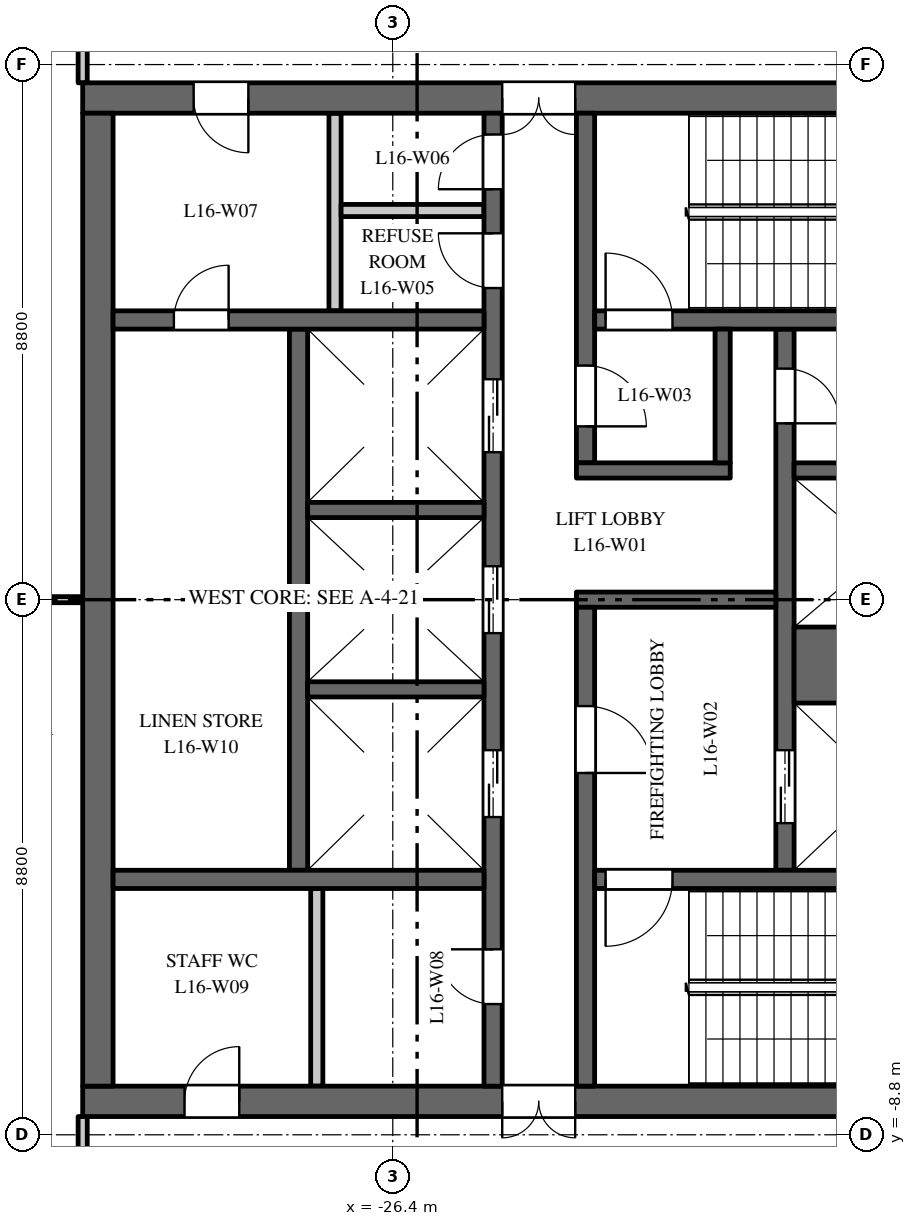
"""IFC4 building model, lengths in metres.
Left out: names, types, materials, properties, quantities, classifications, styles, units other than length and angle.
Written with IfcOpenShell. Run it as: python <this file> out.ifc"""

import sys

from ifc_helpers import new_model, si_unit, direction, frame, frame_2d, origin, place, context, subcontext, project, spatial, rectangle, extrude, element, fill, save


model = new_model("IFC4")
c1 = context("Model", 3, precision=1e-05, world=origin(), true_north=direction((0.0, 1.0)))
c2 = subcontext(c1, "Body", "Model", "MODEL_VIEW")
j1 = project(units=[si_unit("LENGTHUNIT", "METRE"), si_unit("PLANEANGLEUNIT", "RADIAN")], contexts=[c1])
p1 = place(None, origin())
s1 = spatial("IfcSite", under=j1, at=p1, CompositionType="ELEMENT")
p2 = place(p1, origin())
s2 = spatial("IfcBuilding", under=s1, at=p2, CompositionType="ELEMENT")
p3 = place(p2, frame((0.0, 0.0, 74.5)))
s3 = spatial("IfcBuildingStorey", under=s2, at=p3, CompositionType="ELEMENT", Elevation=74.5)
p4 = place(p3, frame((-16.5, 8.25, 0.0), z_axis=(0.0, 0.0, 1.0), x_axis=(-1.0, 0.0, 0.0)))
e1 = element("IfcWall", 1, at=p4, inside=s3, PredefinedType="SHEAR", context=c2, shape_type="SweptSolid", body=[
    extrude(rectangle(XDim=15.0, YDim=0.5, at=frame_2d((7.5, 0.0))), origin(), (0.0, 0.0, 1.0), 3.7),
])
p5 = place(p4, frame((6.9, 0.0, 0.0)))
e2 = element("IfcOpeningElement", 2, at=p5, cuts=e1, PredefinedType="OPENING", context=c2, shape_type="SweptSolid", body=[
    extrude(rectangle(XDim=1.2, YDim=2.1, at=frame_2d((0.6, 1.05))), frame((0.0, 0.26, 0.0), z_axis=(0.0, -1.0, 0.0), x_axis=(1.0, 0.0, 0.0)), (0.0, 0.0, 1.0), 0.52),
])
p6 = place(p4, frame((12.275, 0.0, 0.0)))
e3 = element("IfcOpeningElement", 3, at=p6, cuts=e1, PredefinedType="OPENING", context=c2, shape_type="SweptSolid", body=[
    extrude(rectangle(XDim=0.9, YDim=2.1, at=frame_2d((0.45, 1.05))), frame((0.0, 0.26, 0.0), z_axis=(0.0, -1.0, 0.0), x_axis=(1.0, 0.0, 0.0)), (0.0, 0.0, 1.0), 0.52),
])
p7 = place(p3, frame((-16.5, -8.25, 0.0), z_axis=(0.0, 0.0, 1.0), x_axis=(-1.0, 0.0, 0.0)))
e4 = element("IfcWall", 4, at=p7, inside=s3, PredefinedType="SHEAR", context=c2, shape_type="SweptSolid", body=[
    extrude(rectangle(XDim=15.0, YDim=0.5, at=frame_2d((7.5, 0.0))), origin(), (0.0, 0.0, 1.0), 3.7),
])
p8 = place(p7, frame((6.9, 0.0, 0.0)))
e5 = element("IfcOpeningElement", 5, at=p8, cuts=e4, PredefinedType="OPENING", context=c2, shape_type="SweptSolid", body=[
    extrude(rectangle(XDim=1.2, YDim=2.1, at=frame_2d((0.6, 1.05))), frame((0.0, 0.26, 0.0), z_axis=(0.0, -1.0, 0.0), x_axis=(1.0, 0.0, 0.0)), (0.0, 0.0, 1.0), 0.52),
])
p9 = place(p7, frame((12.425, 0.0, 0.0)))
e6 = element("IfcOpeningElement", 6, at=p9, cuts=e4, PredefinedType="OPENING", context=c2, shape_type="SweptSolid", body=[
    extrude(rectangle(XDim=0.9, YDim=2.1, at=frame_2d((0.45, 1.05))), frame((0.0, 0.26, 0.0), z_axis=(0.0, -1.0, 0.0), x_axis=(1.0, 0.0, 0.0)), (0.0, 0.0, 1.0), 0.52),
])
p10 = place(p3, frame((-27.95, -4.45, 0.0), z_axis=(0.0, 0.0, 1.0), x_axis=(0.0, 1.0, 0.0)))
e7 = element("IfcWall", 7, at=p10, inside=s3, PredefinedType="SHEAR", context=c2, shape_type="SweptSolid", body=[
    extrude(rectangle(XDim=8.9, YDim=0.3, at=frame_2d((4.45, 0.0))), origin(), (0.0, 0.0, 1.0), 3.7),
])
p11 = place(p3, frame((-19.95, -4.45, 0.0), z_axis=(0.0, 0.0, 1.0), x_axis=(0.0, 1.0, 0.0)))
e8 = element("IfcWall", 8, at=p11, inside=s3, PredefinedType="SHEAR", context=c2, shape_type="SweptSolid", body=[
    extrude(rectangle(XDim=8.9, YDim=0.3, at=frame_2d((4.45, 0.0))), origin(), (0.0, 0.0, 1.0), 3.7),
])
p12 = place(p11, frame((0.775, 0.0, 0.0)))
e9 = element("IfcOpeningElement", 9, at=p12, cuts=e8, PredefinedType="OPENING", context=c2, shape_type="SweptSolid", body=[
    extrude(rectangle(XDim=1.2, YDim=2.1, at=frame_2d((0.6, 1.05))), frame((0.0, 0.16, 0.0), z_axis=(0.0, -1.0, 0.0), x_axis=(1.0, 0.0, 0.0)), (0.0, 0.0, 1.0), 0.32),
])
p13 = place(p11, frame((7.35, 0.0, 0.0)))
e10 = element("IfcOpeningElement", 10, at=p13, cuts=e8, PredefinedType="OPENING", context=c2, shape_type="SweptSolid", body=[
    extrude(rectangle(XDim=0.9, YDim=2.1, at=frame_2d((0.45, 1.05))), frame((0.0, 0.16, 0.0), z_axis=(0.0, -1.0, 0.0), x_axis=(1.0, 0.0, 0.0)), (0.0, 0.0, 1.0), 0.32),
])
p14 = place(p3, frame((-24.75, -8.0, 0.0), z_axis=(0.0, 0.0, 1.0), x_axis=(0.0, 1.0, 0.0)))
e11 = element("IfcWall", 11, at=p14, inside=s3, PredefinedType="SHEAR", context=c2, shape_type="SweptSolid", body=[
    extrude(rectangle(XDim=16.0, YDim=0.3, at=frame_2d((8.0, 0.0))), origin(), (0.0, 0.0, 1.0), 3.7),
])
p15 = place(p14, frame((4.425, 0.0, 0.0)))
e12 = element("IfcOpeningElement", 12, at=p15, cuts=e11, PredefinedType="OPENING", context=c2, shape_type="SweptSolid", body=[
    extrude(rectangle(XDim=1.1, YDim=2.1, at=frame_2d((0.55, 1.05))), frame((0.0, 0.16, 0.0), z_axis=(0.0, -1.0, 0.0), x_axis=(1.0, 0.0, 0.0)), (0.0, 0.0, 1.0), 0.32),
])
p16 = place(p14, frame((7.45, 0.0, 0.0)))
e13 = element("IfcOpeningElement", 13, at=p16, cuts=e11, PredefinedType="OPENING", context=c2, shape_type="SweptSolid", body=[
    extrude(rectangle(XDim=1.1, YDim=2.1, at=frame_2d((0.55, 1.05))), frame((0.0, 0.16, 0.0), z_axis=(0.0, -1.0, 0.0), x_axis=(1.0, 0.0, 0.0)), (0.0, 0.0, 1.0), 0.32),
])
p17 = place(p14, frame((10.425, 0.0, 0.0)))
e14 = element("IfcOpeningElement", 14, at=p17, cuts=e11, PredefinedType="OPENING", context=c2, shape_type="SweptSolid", body=[
    extrude(rectangle(XDim=1.2, YDim=2.1, at=frame_2d((0.6, 1.05))), frame((0.0, 0.16, 0.0), z_axis=(0.0, -1.0, 0.0), x_axis=(1.0, 0.0, 0.0)), (0.0, 0.0, 1.0), 0.32),
])
p18 = place(p14, frame((13.125, 0.0, 0.0)))
e15 = element("IfcOpeningElement", 15, at=p18, cuts=e11, PredefinedType="OPENING", context=c2, shape_type="SweptSolid", body=[
    extrude(rectangle(XDim=0.9, YDim=2.1, at=frame_2d((0.45, 1.05))), frame((0.0, 0.16, 0.0), z_axis=(0.0, -1.0, 0.0), x_axis=(1.0, 0.0, 0.0)), (0.0, 0.0, 1.0), 0.32),
])
p19 = place(p14, frame((14.75, 0.0, 0.0)))
e16 = element("IfcOpeningElement", 16, at=p19, cuts=e11, PredefinedType="OPENING", context=c2, shape_type="SweptSolid", body=[
    extrude(rectangle(XDim=0.9, YDim=2.1, at=frame_2d((0.45, 1.05))), frame((0.0, 0.16, 0.0), z_axis=(0.0, -1.0, 0.0), x_axis=(1.0, 0.0, 0.0)), (0.0, 0.0, 1.0), 0.32),
])
p20 = place(p14, frame((1.35, 0.0, 0.0)))
e17 = element("IfcOpeningElement", 17, at=p20, cuts=e11, PredefinedType="OPENING", context=c2, shape_type="SweptSolid", body=[
    extrude(rectangle(XDim=0.9, YDim=2.1, at=frame_2d((0.45, 1.05))), frame((0.0, 0.16, 0.0), z_axis=(0.0, -1.0, 0.0), x_axis=(1.0, 0.0, 0.0)), (0.0, 0.0, 1.0), 0.32),
])
p21 = place(p3, frame((-20.1, 0.0, 0.0), z_axis=(0.0, 0.0, 1.0), x_axis=(-1.0, 0.0, 0.0)))
e18 = element("IfcWall", 18, at=p21, inside=s3, PredefinedType="SHEAR", context=c2, shape_type="SweptSolid", body=[
    extrude(rectangle(XDim=3.28, YDim=0.25, at=frame_2d((1.64, 0.0))), origin(), (0.0, 0.0, 1.0), 3.7),
])
p22 = place(p3, frame((-31.25, -8.0, 0.0), z_axis=(0.0, 0.0, 1.0), x_axis=(0.0, 1.0, 0.0)))
e19 = element("IfcWall", 19, at=p22, inside=s3, PredefinedType="SHEAR", context=c2, shape_type="SweptSolid", body=[
    extrude(rectangle(XDim=16.0, YDim=0.5, at=frame_2d((8.0, 0.0))), origin(), (0.0, 0.0, 1.0), 3.7),
])
p23 = place(p3, frame((-24.9, 4.6, 0.0), z_axis=(0.0, 0.0, 1.0), x_axis=(-1.0, 0.0, 0.0)))
e20 = element("IfcWall", 20, at=p23, inside=s3, PredefinedType="SHEAR", context=c2, shape_type="SweptSolid", body=[
    extrude(rectangle(XDim=6.1, YDim=0.3, at=frame_2d((3.05, 0.0))), origin(), (0.0, 0.0, 1.0), 3.7),
])
p24 = place(p23, frame((4.2, 0.0, 0.0)))
e21 = element("IfcOpeningElement", 21, at=p24, cuts=e20, PredefinedType="OPENING", context=c2, shape_type="SweptSolid", body=[
    extrude(rectangle(XDim=0.9, YDim=2.1, at=frame_2d((0.45, 1.05))), frame((0.0, 0.16, 0.0), z_axis=(0.0, -1.0, 0.0), x_axis=(1.0, 0.0, 0.0)), (0.0, 0.0, 1.0), 0.32),
])
for number, where, z_axis, x_axis in (
    (22, (-27.35, 4.75, 0.0), (0.0, 0.0, 1.0), (0.0, 1.0, 0.0)),
    (23, (-27.65, -8.0, 0.0), (0.0, 0.0, 1.0), (0.0, 1.0, 0.0)),
):
    element("IfcWall", number, at=place(p3, frame(where, z_axis=z_axis, x_axis=x_axis)), inside=s3, PredefinedType="PARTITIONING", context=c2, shape_type="SweptSolid", body=[
        extrude(rectangle(XDim=3.25, YDim=0.2, at=frame_2d((1.625, 0.0))), origin(), (0.0, 0.0, 1.0), 3.7),
    ])
p25 = place(p3, frame((-24.9, 6.4, 0.0), z_axis=(0.0, 0.0, 1.0), x_axis=(-1.0, 0.0, 0.0)))
e24 = element("IfcWall", 24, at=p25, inside=s3, PredefinedType="PARTITIONING", context=c2, shape_type="SweptSolid", body=[
    extrude(rectangle(XDim=2.35, YDim=0.2, at=frame_2d((1.175, 0.0))), origin(), (0.0, 0.0, 1.0), 3.7),
])
p26 = place(p3, frame((-24.9, -4.6, 0.0), z_axis=(0.0, 0.0, 1.0), x_axis=(-1.0, 0.0, 0.0)))
e25 = element("IfcWall", 25, at=p26, inside=s3, PredefinedType="SHEAR", context=c2, shape_type="SweptSolid", body=[
    extrude(rectangle(XDim=6.1, YDim=0.3, at=frame_2d((3.05, 0.0))), origin(), (0.0, 0.0, 1.0), 3.7),
])
p27 = place(p3, frame((-16.9, -1.075, 0.0), z_axis=(0.0, 0.0, 1.0), x_axis=(-1.0, 0.0, 0.0)))
e26 = element("IfcWall", 26, at=p27, inside=s3, PredefinedType="SHEAR", context=c2, shape_type="SweptSolid", body=[
    extrude(rectangle(XDim=2.9, YDim=1.25, at=frame_2d((1.45, 0.0))), origin(), (0.0, 0.0, 1.0), 3.7),
])
for number, where, z_axis, x_axis in (
    (27, (-16.9, 2.125, 0.0), (0.0, 0.0, 1.0), (-1.0, 0.0, 0.0)),
    (28, (-24.9, -1.475, 0.0), (0.0, 0.0, 1.0), (-1.0, 0.0, 0.0)),
    (29, (-24.9, 1.475, 0.0), (0.0, 0.0, 1.0), (-1.0, 0.0, 0.0)),
):
    element("IfcWall", number, at=place(p3, frame(where, z_axis=z_axis, x_axis=x_axis)), inside=s3, PredefinedType="SHEAR", context=c2, shape_type="SweptSolid", body=[
        extrude(rectangle(XDim=2.9, YDim=0.25, at=frame_2d((1.45, 0.0))), origin(), (0.0, 0.0, 1.0), 3.7),
    ])
p28 = place(p3, frame((-23.23, 2.25, 0.0), z_axis=(0.0, 0.0, 1.0), x_axis=(0.0, 1.0, 0.0)))
e30 = element("IfcWall", 30, at=p28, inside=s3, PredefinedType="SHEAR", context=c2, shape_type="SweptSolid", body=[
    extrude(rectangle(XDim=5.75, YDim=0.3, at=frame_2d((2.875, 0.0))), origin(), (0.0, 0.0, 1.0), 3.7),
])
p29 = place(p28, frame((0.6, 0.0, 0.0)))
e31 = element("IfcOpeningElement", 31, at=p29, cuts=e30, PredefinedType="OPENING", context=c2, shape_type="SweptSolid", body=[
    extrude(rectangle(XDim=1.0, YDim=2.1, at=frame_2d((0.5, 1.05))), frame((0.0, 0.16, 0.0), z_axis=(0.0, -1.0, 0.0), x_axis=(1.0, 0.0, 0.0)), (0.0, 0.0, 1.0), 0.32),
])
p30 = place(p3, frame((-23.23, -8.0, 0.0), z_axis=(0.0, 0.0, 1.0), x_axis=(0.0, 1.0, 0.0)))
e32 = element("IfcWall", 32, at=p30, inside=s3, PredefinedType="SHEAR", context=c2, shape_type="SweptSolid", body=[
    extrude(rectangle(XDim=7.875, YDim=0.3, at=frame_2d((3.938, 0.0))), origin(), (0.0, 0.0, 1.0), 3.7),
])
p31 = place(p30, frame((5.15, 0.0, 0.0)))
e33 = element("IfcOpeningElement", 33, at=p31, cuts=e32, PredefinedType="OPENING", context=c2, shape_type="SweptSolid", body=[
    extrude(rectangle(XDim=1.1, YDim=2.1, at=frame_2d((0.55, 1.05))), frame((0.0, 0.16, 0.0), z_axis=(0.0, -1.0, 0.0), x_axis=(1.0, 0.0, 0.0)), (0.0, 0.0, 1.0), 0.32),
])
p32 = place(p3, frame((-16.9, 4.6, 0.0), z_axis=(0.0, 0.0, 1.0), x_axis=(-1.0, 0.0, 0.0)))
e34 = element("IfcWall", 34, at=p32, inside=s3, PredefinedType="SHEAR", context=c2, shape_type="SweptSolid", body=[
    extrude(rectangle(XDim=6.18, YDim=0.3, at=frame_2d((3.09, 0.0))), origin(), (0.0, 0.0, 1.0), 3.7),
])
p33 = place(p32, frame((4.9, 0.0, 0.0)))
e35 = element("IfcOpeningElement", 35, at=p33, cuts=e34, PredefinedType="OPENING", context=c2, shape_type="SweptSolid", body=[
    extrude(rectangle(XDim=1.1, YDim=2.1, at=frame_2d((0.55, 1.05))), frame((0.0, 0.16, 0.0), z_axis=(0.0, -1.0, 0.0), x_axis=(1.0, 0.0, 0.0)), (0.0, 0.0, 1.0), 0.32),
])
p34 = place(p3, frame((-16.9, -4.6, 0.0), z_axis=(0.0, 0.0, 1.0), x_axis=(-1.0, 0.0, 0.0)))
e36 = element("IfcWall", 36, at=p34, inside=s3, PredefinedType="SHEAR", context=c2, shape_type="SweptSolid", body=[
    extrude(rectangle(XDim=6.18, YDim=0.3, at=frame_2d((3.09, 0.0))), origin(), (0.0, 0.0, 1.0), 3.7),
])
p35 = place(p34, frame((4.9, 0.0, 0.0)))
e37 = element("IfcOpeningElement", 37, at=p35, cuts=e36, PredefinedType="OPENING", context=c2, shape_type="SweptSolid", body=[
    extrude(rectangle(XDim=1.1, YDim=2.1, at=frame_2d((0.55, 1.05))), frame((0.0, 0.16, 0.0), z_axis=(0.0, -1.0, 0.0), x_axis=(1.0, 0.0, 0.0)), (0.0, 0.0, 1.0), 0.32),
])
p36 = place(p3, frame((-20.85, 2.125, 0.0), z_axis=(0.0, 0.0, 1.0), x_axis=(-1.0, 0.0, 0.0)))
e38 = element("IfcWall", 38, at=p36, inside=s3, PredefinedType="SHEAR", context=c2, shape_type="SweptSolid", body=[
    extrude(rectangle(XDim=2.53, YDim=0.25, at=frame_2d((1.265, 0.0))), origin(), (0.0, 0.0, 1.0), 3.7),
])
p37 = place(p3, frame((-20.975, 2.25, 0.0), z_axis=(0.0, 0.0, 1.0), x_axis=(0.0, 1.0, 0.0)))
e39 = element("IfcWall", 39, at=p37, inside=s3, PredefinedType="SHEAR", context=c2, shape_type="SweptSolid", body=[
    extrude(rectangle(XDim=2.2, YDim=0.25, at=frame_2d((1.1, 0.0))), origin(), (0.0, 0.0, 1.0), 3.7),
])
p38 = place(p3, frame((-35.949, 0.0, 0.0), z_axis=(0.0, 0.0, 1.0), x_axis=(1.0, 0.0, 0.0)))
e40 = element("IfcWall", 40, at=p38, inside=s3, PredefinedType="PARTITIONING", context=c2, shape_type="SweptSolid", body=[
    extrude(rectangle(XDim=4.449, YDim=0.1, at=frame_2d((2.225, 0.0))), origin(), (0.0, 0.0, 1.0), 2.85),
])
for number, where, z_axis, x_axis in (
    (41, (-31.5, -10.7, 0.0), (0.0, 0.0, 1.0), (0.0, 1.0, 0.0)),
    (42, (-31.5, 8.5, 0.0), (0.0, 0.0, 1.0), (0.0, 1.0, 0.0)),
):
    element("IfcWall", number, at=place(p3, frame(where, z_axis=z_axis, x_axis=x_axis)), inside=s3, PredefinedType="PARTITIONING", context=c2, shape_type="SweptSolid", body=[
        extrude(rectangle(XDim=2.2, YDim=0.15, at=frame_2d((1.1, 0.0))), origin(), (0.0, 0.0, 1.0), 3.7),
    ])
p39 = place(p12, origin())
e43 = element("IfcDoor", 43, at=p39, inside=s3, OperationType="DOUBLE_DOOR_SLIDING", PredefinedType="DOOR", context=c2, shape_type="SweptSolid", body=[
    extrude(rectangle(XDim=1.2, YDim=2.1, at=frame_2d((0.6, 1.05))), frame((0.0, 0.025, 0.0), z_axis=(0.0, -1.0, 0.0), x_axis=(1.0, 0.0, 0.0)), (0.0, 0.0, 1.0), 0.05),
])
fill(e9, e43)
p40 = place(p15, origin())
e44 = element("IfcDoor", 44, at=p40, inside=s3, OperationType="DOUBLE_DOOR_SLIDING", PredefinedType="DOOR", context=c2, shape_type="SweptSolid", body=[
    extrude(rectangle(XDim=1.1, YDim=2.1, at=frame_2d((0.55, 1.05))), frame((0.0, 0.025, 0.0), z_axis=(0.0, -1.0, 0.0), x_axis=(1.0, 0.0, 0.0)), (0.0, 0.0, 1.0), 0.05),
])
fill(e12, e44)
p41 = place(p16, origin())
e45 = element("IfcDoor", 45, at=p41, inside=s3, OperationType="DOUBLE_DOOR_SLIDING", PredefinedType="DOOR", context=c2, shape_type="SweptSolid", body=[
    extrude(rectangle(XDim=1.1, YDim=2.1, at=frame_2d((0.55, 1.05))), frame((0.0, 0.025, 0.0), z_axis=(0.0, -1.0, 0.0), x_axis=(1.0, 0.0, 0.0)), (0.0, 0.0, 1.0), 0.05),
])
fill(e13, e45)
p42 = place(p17, origin())
e46 = element("IfcDoor", 46, at=p42, inside=s3, OperationType="DOUBLE_DOOR_SLIDING", PredefinedType="DOOR", context=c2, shape_type="SweptSolid", body=[
    extrude(rectangle(XDim=1.2, YDim=2.1, at=frame_2d((0.6, 1.05))), frame((0.0, 0.025, 0.0), z_axis=(0.0, -1.0, 0.0), x_axis=(1.0, 0.0, 0.0)), (0.0, 0.0, 1.0), 0.05),
])
fill(e14, e46)
p43 = place(p33, origin())
e47 = element("IfcDoor", 47, at=p43, inside=s3, OperationType="SINGLE_SWING_RIGHT", PredefinedType="DOOR", context=c2, shape_type="SweptSolid", body=[
    extrude(rectangle(XDim=1.1, YDim=2.1, at=frame_2d((0.55, 1.05))), frame((0.0, 0.025, 0.0), z_axis=(0.0, -1.0, 0.0), x_axis=(1.0, 0.0, 0.0)), (0.0, 0.0, 1.0), 0.05),
])
fill(e35, e47)
p44 = place(p35, origin())
e48 = element("IfcDoor", 48, at=p44, inside=s3, OperationType="SINGLE_SWING_LEFT", PredefinedType="DOOR", context=c2, shape_type="SweptSolid", body=[
    extrude(rectangle(XDim=1.1, YDim=2.1, at=frame_2d((0.55, 1.05))), frame((0.0, 0.025, 0.0), z_axis=(0.0, -1.0, 0.0), x_axis=(1.0, 0.0, 0.0)), (0.0, 0.0, 1.0), 0.05),
])
fill(e37, e48)
p45 = place(p31, origin())
e49 = element("IfcDoor", 49, at=p45, inside=s3, OperationType="SINGLE_SWING_LEFT", PredefinedType="DOOR", context=c2, shape_type="SweptSolid", body=[
    extrude(rectangle(XDim=1.1, YDim=2.1, at=frame_2d((0.55, 1.05))), frame((0.0, 0.025, 0.0), z_axis=(0.0, -1.0, 0.0), x_axis=(1.0, 0.0, 0.0)), (0.0, 0.0, 1.0), 0.05),
])
fill(e33, e49)
p46 = place(p29, origin())
e50 = element("IfcDoor", 50, at=p46, inside=s3, OperationType="SINGLE_SWING_LEFT", PredefinedType="DOOR", context=c2, shape_type="SweptSolid", body=[
    extrude(rectangle(XDim=1.0, YDim=2.1, at=frame_2d((0.5, 1.05))), frame((0.0, 0.025, 0.0), z_axis=(0.0, -1.0, 0.0), x_axis=(1.0, 0.0, 0.0)), (0.0, 0.0, 1.0), 0.05),
])
fill(e31, e50)
p47 = place(p5, origin())
e51 = element("IfcDoor", 51, at=p47, inside=s3, OperationType="DOUBLE_DOOR_DOUBLE_SWING", PredefinedType="DOOR", context=c2, shape_type="SweptSolid", body=[
    extrude(rectangle(XDim=1.2, YDim=2.1, at=frame_2d((0.6, 1.05))), frame((0.0, 0.025, 0.0), z_axis=(0.0, -1.0, 0.0), x_axis=(1.0, 0.0, 0.0)), (0.0, 0.0, 1.0), 0.05),
])
fill(e2, e51)
p48 = place(p8, origin())
e52 = element("IfcDoor", 52, at=p48, inside=s3, OperationType="DOUBLE_DOOR_DOUBLE_SWING", PredefinedType="DOOR", context=c2, shape_type="SweptSolid", body=[
    extrude(rectangle(XDim=1.2, YDim=2.1, at=frame_2d((0.6, 1.05))), frame((0.0, 0.025, 0.0), z_axis=(0.0, -1.0, 0.0), x_axis=(1.0, 0.0, 0.0)), (0.0, 0.0, 1.0), 0.05),
])
fill(e5, e52)
p49 = place(p13, origin())
e53 = element("IfcDoor", 53, at=p49, inside=s3, OperationType="SINGLE_SWING_LEFT", PredefinedType="DOOR", context=c2, shape_type="SweptSolid", body=[
    extrude(rectangle(XDim=0.9, YDim=2.1, at=frame_2d((0.45, 1.05))), frame((0.0, 0.025, 0.0), z_axis=(0.0, -1.0, 0.0), x_axis=(1.0, 0.0, 0.0)), (0.0, 0.0, 1.0), 0.05),
])
fill(e10, e53)
p50 = place(p18, origin())
e54 = element("IfcDoor", 54, at=p50, inside=s3, OperationType="SINGLE_SWING_LEFT", PredefinedType="DOOR", context=c2, shape_type="SweptSolid", body=[
    extrude(rectangle(XDim=0.9, YDim=2.1, at=frame_2d((0.45, 1.05))), frame((0.0, 0.025, 0.0), z_axis=(0.0, -1.0, 0.0), x_axis=(1.0, 0.0, 0.0)), (0.0, 0.0, 1.0), 0.05),
])
fill(e15, e54)
p51 = place(p19, origin())
e55 = element("IfcDoor", 55, at=p51, inside=s3, OperationType="SINGLE_SWING_RIGHT", PredefinedType="DOOR", context=c2, shape_type="SweptSolid", body=[
    extrude(rectangle(XDim=0.9, YDim=2.1, at=frame_2d((0.45, 1.05))), frame((0.0, 0.025, 0.0), z_axis=(0.0, -1.0, 0.0), x_axis=(1.0, 0.0, 0.0)), (0.0, 0.0, 1.0), 0.05),
])
fill(e16, e55)
p52 = place(p6, origin())
e56 = element("IfcDoor", 56, at=p52, inside=s3, OperationType="SINGLE_SWING_RIGHT", PredefinedType="DOOR", context=c2, shape_type="SweptSolid", body=[
    extrude(rectangle(XDim=0.9, YDim=2.1, at=frame_2d((0.45, 1.05))), frame((0.0, 0.025, 0.0), z_axis=(0.0, -1.0, 0.0), x_axis=(1.0, 0.0, 0.0)), (0.0, 0.0, 1.0), 0.05),
])
fill(e3, e56)
p53 = place(p20, origin())
e57 = element("IfcDoor", 57, at=p53, inside=s3, OperationType="SINGLE_SWING_LEFT", PredefinedType="DOOR", context=c2, shape_type="SweptSolid", body=[
    extrude(rectangle(XDim=0.9, YDim=2.1, at=frame_2d((0.45, 1.05))), frame((0.0, 0.025, 0.0), z_axis=(0.0, -1.0, 0.0), x_axis=(1.0, 0.0, 0.0)), (0.0, 0.0, 1.0), 0.05),
])
fill(e17, e57)
p54 = place(p9, origin())
e58 = element("IfcDoor", 58, at=p54, inside=s3, OperationType="SINGLE_SWING_LEFT", PredefinedType="DOOR", context=c2, shape_type="SweptSolid", body=[
    extrude(rectangle(XDim=0.9, YDim=2.1, at=frame_2d((0.45, 1.05))), frame((0.0, 0.025, 0.0), z_axis=(0.0, -1.0, 0.0), x_axis=(1.0, 0.0, 0.0)), (0.0, 0.0, 1.0), 0.05),
])
fill(e6, e58)
p55 = place(p24, origin())
e59 = element("IfcDoor", 59, at=p55, inside=s3, OperationType="SINGLE_SWING_LEFT", PredefinedType="DOOR", context=c2, shape_type="SweptSolid", body=[
    extrude(rectangle(XDim=0.9, YDim=2.1, at=frame_2d((0.45, 1.05))), frame((0.0, 0.025, 0.0), z_axis=(0.0, -1.0, 0.0), x_axis=(1.0, 0.0, 0.0)), (0.0, 0.0, 1.0), 0.05),
])
fill(e21, e59)
save(model, sys.argv[1])
